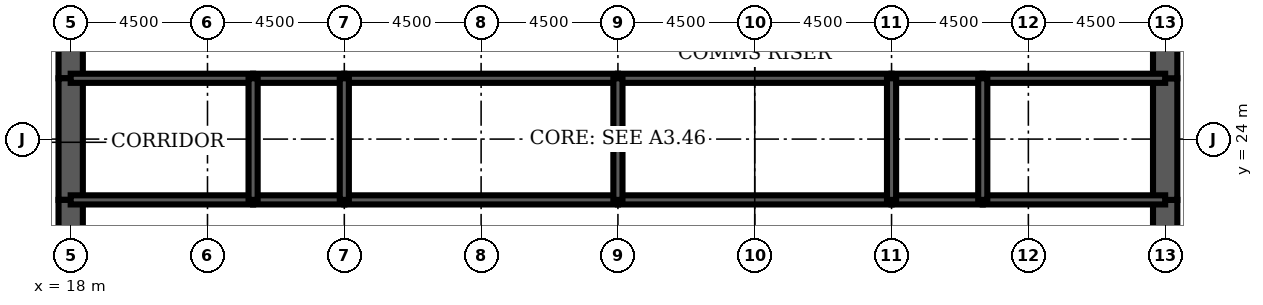
"""IFC4 building model, lengths in metres.
Left out: names, types, materials, properties, quantities, classifications, styles, units other than length and angle.
Written with IfcOpenShell. Run it as: python <this file> out.ifc"""

import sys

from ifc_helpers import new_model, si_unit, direction, frame, frame_2d, origin, place, context, subcontext, project, spatial, rectangle, extrude, element, fill, save


model = new_model("IFC4")
c1 = context("Model", 3, precision=1e-05, world=origin(), true_north=direction((0.0, 1.0)))
c2 = subcontext(c1, "Body", "Model", "MODEL_VIEW")
j1 = project(units=[si_unit("LENGTHUNIT", "METRE"), si_unit("PLANEANGLEUNIT", "RADIAN")], contexts=[c1])
p1 = place(None, origin())
s1 = spatial("IfcSite", under=j1, at=p1, CompositionType="ELEMENT")
p2 = place(p1, origin())
s2 = spatial("IfcBuilding", under=s1, at=p2, CompositionType="ELEMENT")
p3 = place(p2, frame((0.0, 0.0, 198.4)))
s3 = spatial("IfcBuildingStorey", under=s2, at=p3, CompositionType="ELEMENT", Elevation=198.4)
p4 = place(p3, frame((18.0, 28.8, 0.0), z_axis=(0.0, 0.0, 1.0), x_axis=(0.0, -1.0, 0.0)))
e1 = element("IfcWall", 1, at=p4, inside=s3, PredefinedType="SHEAR", context=c2, shape_type="SweptSolid", body=[
    extrude(rectangle(XDim=2.8, YDim=0.8, at=frame_2d((1.4, 0.0))), origin(), (0.0, 0.0, 1.0), 4.2),
])
p5 = place(p4, frame((0.4, 0.0, 0.0)))
e2 = element("IfcOpeningElement", 2, at=p5, cuts=e1, PredefinedType="OPENING", context=c2, shape_type="SweptSolid", body=[
    extrude(rectangle(XDim=1.8, YDim=2.1, at=frame_2d((0.9, 1.05))), frame((0.0, 0.41, 0.0), z_axis=(0.0, -1.0, 0.0), x_axis=(1.0, 0.0, 0.0)), (0.0, 0.0, 1.0), 0.82),
])
p6 = place(p3, frame((18.0, 26.0, 0.0), z_axis=(0.0, 0.0, 1.0), x_axis=(0.0, -1.0, 0.0)))
e3 = element("IfcWall", 3, at=p6, inside=s3, PredefinedType="SHEAR", context=c2, shape_type="SweptSolid", body=[
    extrude(rectangle(XDim=4.0, YDim=0.8, at=frame_2d((2.0, 0.0))), origin(), (0.0, 0.0, 1.0), 4.2),
])
p7 = place(p3, frame((18.0, 22.0, 0.0), z_axis=(0.0, 0.0, 1.0), x_axis=(0.0, -1.0, 0.0)))
e4 = element("IfcWall", 4, at=p7, inside=s3, PredefinedType="SHEAR", context=c2, shape_type="SweptSolid", body=[
    extrude(rectangle(XDim=2.8, YDim=0.8, at=frame_2d((1.4, 0.0))), origin(), (0.0, 0.0, 1.0), 4.2),
])
p8 = place(p7, frame((0.6, 0.0, 0.0)))
e5 = element("IfcOpeningElement", 5, at=p8, cuts=e4, PredefinedType="OPENING", context=c2, shape_type="SweptSolid", body=[
    extrude(rectangle(XDim=1.8, YDim=2.1, at=frame_2d((0.9, 1.05))), frame((0.0, 0.41, 0.0), z_axis=(0.0, -1.0, 0.0), x_axis=(1.0, 0.0, 0.0)), (0.0, 0.0, 1.0), 0.82),
])
p9 = place(p3, frame((54.0, 19.2, 0.0), z_axis=(0.0, 0.0, 1.0), x_axis=(0.0, 1.0, 0.0)))
e6 = element("IfcWall", 6, at=p9, inside=s3, PredefinedType="SHEAR", context=c2, shape_type="SweptSolid", body=[
    extrude(rectangle(XDim=2.8, YDim=0.8, at=frame_2d((1.4, 0.0))), origin(), (0.0, 0.0, 1.0), 4.2),
])
p10 = place(p9, frame((0.4, 0.0, 0.0)))
e7 = element("IfcOpeningElement", 7, at=p10, cuts=e6, PredefinedType="OPENING", context=c2, shape_type="SweptSolid", body=[
    extrude(rectangle(XDim=1.8, YDim=2.1, at=frame_2d((0.9, 1.05))), frame((0.0, 0.41, 0.0), z_axis=(0.0, -1.0, 0.0), x_axis=(1.0, 0.0, 0.0)), (0.0, 0.0, 1.0), 0.82),
])
p11 = place(p3, frame((54.0, 22.0, 0.0), z_axis=(0.0, 0.0, 1.0), x_axis=(0.0, 1.0, 0.0)))
e8 = element("IfcWall", 8, at=p11, inside=s3, PredefinedType="SHEAR", context=c2, shape_type="SweptSolid", body=[
    extrude(rectangle(XDim=4.0, YDim=0.8, at=frame_2d((2.0, 0.0))), origin(), (0.0, 0.0, 1.0), 4.2),
])
p12 = place(p3, frame((54.0, 26.0, 0.0), z_axis=(0.0, 0.0, 1.0), x_axis=(0.0, 1.0, 0.0)))
e9 = element("IfcWall", 9, at=p12, inside=s3, PredefinedType="SHEAR", context=c2, shape_type="SweptSolid", body=[
    extrude(rectangle(XDim=2.8, YDim=0.8, at=frame_2d((1.4, 0.0))), origin(), (0.0, 0.0, 1.0), 4.2),
])
p13 = place(p12, frame((0.6, 0.0, 0.0)))
e10 = element("IfcOpeningElement", 10, at=p13, cuts=e9, PredefinedType="OPENING", context=c2, shape_type="SweptSolid", body=[
    extrude(rectangle(XDim=1.8, YDim=2.1, at=frame_2d((0.9, 1.05))), frame((0.0, 0.41, 0.0), z_axis=(0.0, -1.0, 0.0), x_axis=(1.0, 0.0, 0.0)), (0.0, 0.0, 1.0), 0.82),
])
p14 = place(p3, frame((18.0, 22.0, 0.0), z_axis=(0.0, 0.0, 1.0), x_axis=(1.0, 0.0, 0.0)))
e11 = element("IfcWall", 11, at=p14, inside=s3, PredefinedType="SOLIDWALL", context=c2, shape_type="SweptSolid", body=[
    extrude(rectangle(XDim=6.0, YDim=0.3, at=frame_2d((3.0, 0.0))), origin(), (0.0, 0.0, 1.0), 4.2),
])
p15 = place(p14, frame((2.0, 0.0, 0.0)))
e12 = element("IfcOpeningElement", 12, at=p15, cuts=e11, PredefinedType="OPENING", context=c2, shape_type="SweptSolid", body=[
    extrude(rectangle(XDim=1.0, YDim=2.1, at=frame_2d((0.5, 1.05))), frame((0.0, 0.16, 0.0), z_axis=(0.0, -1.0, 0.0), x_axis=(1.0, 0.0, 0.0)), (0.0, 0.0, 1.0), 0.32),
])
p16 = place(p3, frame((24.0, 22.0, 0.0), z_axis=(0.0, 0.0, 1.0), x_axis=(1.0, 0.0, 0.0)))
e13 = element("IfcWall", 13, at=p16, inside=s3, PredefinedType="SOLIDWALL", context=c2, shape_type="SweptSolid", body=[
    extrude(rectangle(XDim=3.0, YDim=0.3, at=frame_2d((1.5, 0.0))), origin(), (0.0, 0.0, 1.0), 4.2),
])
p17 = place(p16, frame((1.0, 0.0, 0.0)))
e14 = element("IfcOpeningElement", 14, at=p17, cuts=e13, PredefinedType="OPENING", context=c2, shape_type="SweptSolid", body=[
    extrude(rectangle(XDim=1.0, YDim=2.1, at=frame_2d((0.5, 1.05))), frame((0.0, 0.16, 0.0), z_axis=(0.0, -1.0, 0.0), x_axis=(1.0, 0.0, 0.0)), (0.0, 0.0, 1.0), 0.32),
])
p18 = place(p3, frame((27.0, 22.0, 0.0), z_axis=(0.0, 0.0, 1.0), x_axis=(1.0, 0.0, 0.0)))
e15 = element("IfcWall", 15, at=p18, inside=s3, PredefinedType="SOLIDWALL", context=c2, shape_type="SweptSolid", body=[
    extrude(rectangle(XDim=9.0, YDim=0.3, at=frame_2d((4.5, 0.0))), origin(), (0.0, 0.0, 1.0), 4.2),
])
p19 = place(p18, frame((4.0, 0.0, 0.0)))
e16 = element("IfcOpeningElement", 16, at=p19, cuts=e15, PredefinedType="OPENING", context=c2, shape_type="SweptSolid", body=[
    extrude(rectangle(XDim=1.0, YDim=2.1, at=frame_2d((0.5, 1.05))), frame((0.0, 0.16, 0.0), z_axis=(0.0, -1.0, 0.0), x_axis=(1.0, 0.0, 0.0)), (0.0, 0.0, 1.0), 0.32),
])
p20 = place(p3, frame((36.0, 22.0, 0.0), z_axis=(0.0, 0.0, 1.0), x_axis=(1.0, 0.0, 0.0)))
e17 = element("IfcWall", 17, at=p20, inside=s3, PredefinedType="SOLIDWALL", context=c2, shape_type="SweptSolid", body=[
    extrude(rectangle(XDim=9.0, YDim=0.3, at=frame_2d((4.5, 0.0))), origin(), (0.0, 0.0, 1.0), 4.2),
])
p21 = place(p20, frame((4.0, 0.0, 0.0)))
e18 = element("IfcOpeningElement", 18, at=p21, cuts=e17, PredefinedType="OPENING", context=c2, shape_type="SweptSolid", body=[
    extrude(rectangle(XDim=1.0, YDim=2.1, at=frame_2d((0.5, 1.05))), frame((0.0, 0.16, 0.0), z_axis=(0.0, -1.0, 0.0), x_axis=(1.0, 0.0, 0.0)), (0.0, 0.0, 1.0), 0.32),
])
p22 = place(p3, frame((45.0, 22.0, 0.0), z_axis=(0.0, 0.0, 1.0), x_axis=(1.0, 0.0, 0.0)))
e19 = element("IfcWall", 19, at=p22, inside=s3, PredefinedType="SOLIDWALL", context=c2, shape_type="SweptSolid", body=[
    extrude(rectangle(XDim=3.0, YDim=0.3, at=frame_2d((1.5, 0.0))), origin(), (0.0, 0.0, 1.0), 4.2),
])
p23 = place(p22, frame((1.0, 0.0, 0.0)))
e20 = element("IfcOpeningElement", 20, at=p23, cuts=e19, PredefinedType="OPENING", context=c2, shape_type="SweptSolid", body=[
    extrude(rectangle(XDim=1.0, YDim=2.1, at=frame_2d((0.5, 1.05))), frame((0.0, 0.16, 0.0), z_axis=(0.0, -1.0, 0.0), x_axis=(1.0, 0.0, 0.0)), (0.0, 0.0, 1.0), 0.32),
])
p24 = place(p3, frame((48.0, 22.0, 0.0), z_axis=(0.0, 0.0, 1.0), x_axis=(1.0, 0.0, 0.0)))
e21 = element("IfcWall", 21, at=p24, inside=s3, PredefinedType="SOLIDWALL", context=c2, shape_type="SweptSolid", body=[
    extrude(rectangle(XDim=6.0, YDim=0.3, at=frame_2d((3.0, 0.0))), origin(), (0.0, 0.0, 1.0), 4.2),
])
p25 = place(p24, frame((2.0, 0.0, 0.0)))
e22 = element("IfcOpeningElement", 22, at=p25, cuts=e21, PredefinedType="OPENING", context=c2, shape_type="SweptSolid", body=[
    extrude(rectangle(XDim=1.0, YDim=2.1, at=frame_2d((0.5, 1.05))), frame((0.0, 0.16, 0.0), z_axis=(0.0, -1.0, 0.0), x_axis=(1.0, 0.0, 0.0)), (0.0, 0.0, 1.0), 0.32),
])
p26 = place(p24, frame((4.05, 0.0, 0.0)))
e23 = element("IfcOpeningElement", 23, at=p26, cuts=e21, PredefinedType="OPENING", context=c2, shape_type="SweptSolid", body=[
    extrude(rectangle(XDim=1.0, YDim=2.1, at=frame_2d((0.5, 1.05))), frame((0.0, 0.16, 0.0), z_axis=(0.0, -1.0, 0.0), x_axis=(1.0, 0.0, 0.0)), (0.0, 0.0, 1.0), 0.32),
])
p27 = place(p3, frame((18.0, 26.0, 0.0), z_axis=(0.0, 0.0, 1.0), x_axis=(1.0, 0.0, 0.0)))
e24 = element("IfcWall", 24, at=p27, inside=s3, PredefinedType="SOLIDWALL", context=c2, shape_type="SweptSolid", body=[
    extrude(rectangle(XDim=6.0, YDim=0.3, at=frame_2d((3.0, 0.0))), origin(), (0.0, 0.0, 1.0), 4.2),
])
p28 = place(p3, frame((24.0, 26.0, 0.0), z_axis=(0.0, 0.0, 1.0), x_axis=(1.0, 0.0, 0.0)))
e25 = element("IfcWall", 25, at=p28, inside=s3, PredefinedType="SOLIDWALL", context=c2, shape_type="SweptSolid", body=[
    extrude(rectangle(XDim=3.0, YDim=0.3, at=frame_2d((1.5, 0.0))), origin(), (0.0, 0.0, 1.0), 4.2),
])
for number, where, z_axis, x_axis in (
    (26, (27.0, 26.0, 0.0), (0.0, 0.0, 1.0), (1.0, 0.0, 0.0)),
    (27, (36.0, 26.0, 0.0), (0.0, 0.0, 1.0), (1.0, 0.0, 0.0)),
):
    element("IfcWall", number, at=place(p3, frame(where, z_axis=z_axis, x_axis=x_axis)), inside=s3, PredefinedType="SOLIDWALL", context=c2, shape_type="SweptSolid", body=[
        extrude(rectangle(XDim=9.0, YDim=0.3, at=frame_2d((4.5, 0.0))), origin(), (0.0, 0.0, 1.0), 4.2),
    ])
p29 = place(p3, frame((45.0, 26.0, 0.0), z_axis=(0.0, 0.0, 1.0), x_axis=(1.0, 0.0, 0.0)))
e28 = element("IfcWall", 28, at=p29, inside=s3, PredefinedType="SOLIDWALL", context=c2, shape_type="SweptSolid", body=[
    extrude(rectangle(XDim=3.0, YDim=0.3, at=frame_2d((1.5, 0.0))), origin(), (0.0, 0.0, 1.0), 4.2),
])
p30 = place(p3, frame((48.0, 26.0, 0.0), z_axis=(0.0, 0.0, 1.0), x_axis=(1.0, 0.0, 0.0)))
e29 = element("IfcWall", 29, at=p30, inside=s3, PredefinedType="SOLIDWALL", context=c2, shape_type="SweptSolid", body=[
    extrude(rectangle(XDim=6.0, YDim=0.3, at=frame_2d((3.0, 0.0))), origin(), (0.0, 0.0, 1.0), 4.2),
])
for number, where, z_axis, x_axis in (
    (30, (24.0, 22.0, 0.0), (0.0, 0.0, 1.0), (0.0, 1.0, 0.0)),
    (31, (27.0, 22.0, 0.0), (0.0, 0.0, 1.0), (0.0, 1.0, 0.0)),
    (32, (36.0, 22.0, 0.0), (0.0, 0.0, 1.0), (0.0, 1.0, 0.0)),
    (33, (45.0, 22.0, 0.0), (0.0, 0.0, 1.0), (0.0, 1.0, 0.0)),
    (34, (48.0, 22.0, 0.0), (0.0, 0.0, 1.0), (0.0, 1.0, 0.0)),
):
    element("IfcWall", number, at=place(p3, frame(where, z_axis=z_axis, x_axis=x_axis)), inside=s3, PredefinedType="SOLIDWALL", context=c2, shape_type="SweptSolid", body=[
        extrude(rectangle(XDim=4.0, YDim=0.3, at=frame_2d((2.0, 0.0))), origin(), (0.0, 0.0, 1.0), 4.2),
    ])
p31 = place(p3, frame((42.0, 22.15, 0.0), z_axis=(0.0, 0.0, 1.0), x_axis=(0.0, 1.0, 0.0)))
e35 = element("IfcWall", 35, at=p31, inside=s3, PredefinedType="PARTITIONING", context=c2, shape_type="SweptSolid", body=[
    extrude(rectangle(XDim=3.7, YDim=0.15, at=frame_2d((1.85, 0.0))), origin(), (0.0, 0.0, 1.0), 3.0),
])
p32 = place(p31, frame((2.2, 0.0, 0.0)))
e36 = element("IfcOpeningElement", 36, at=p32, cuts=e35, PredefinedType="OPENING", context=c2, shape_type="SweptSolid", body=[
    extrude(rectangle(XDim=1.0, YDim=2.1, at=frame_2d((0.5, 1.05))), frame((0.0, 0.085, 0.0), z_axis=(0.0, -1.0, 0.0), x_axis=(1.0, 0.0, 0.0)), (0.0, 0.0, 1.0), 0.17),
])
p33 = place(p3, frame((51.425, 22.15, 0.0), z_axis=(0.0, 0.0, 1.0), x_axis=(0.0, 1.0, 0.0)))
e37 = element("IfcWall", 37, at=p33, inside=s3, PredefinedType="PARTITIONING", context=c2, shape_type="SweptSolid", body=[
    extrude(rectangle(XDim=3.7, YDim=0.15, at=frame_2d((1.85, 0.0))), origin(), (0.0, 0.0, 1.0), 3.0),
])
p34 = place(p3, frame((49.4, 19.35, 0.0), z_axis=(0.0, 0.0, 1.0), x_axis=(0.0, 1.0, 0.0)))
e38 = element("IfcWall", 38, at=p34, inside=s3, PredefinedType="PARTITIONING", context=c2, shape_type="SweptSolid", body=[
    extrude(rectangle(XDim=2.5, YDim=0.15, at=frame_2d((1.25, 0.0))), origin(), (0.0, 0.0, 1.0), 3.0),
])
p35 = place(p34, frame((1.15, 0.0, 0.0)))
e39 = element("IfcOpeningElement", 39, at=p35, cuts=e38, PredefinedType="OPENING", context=c2, shape_type="SweptSolid", body=[
    extrude(rectangle(XDim=1.0, YDim=2.1, at=frame_2d((0.5, 1.05))), frame((0.0, 0.085, 0.0), z_axis=(0.0, -1.0, 0.0), x_axis=(1.0, 0.0, 0.0)), (0.0, 0.0, 1.0), 0.17),
])
p36 = place(p32, origin())
e40 = element("IfcDoor", 40, at=p36, inside=s3, OperationType="SINGLE_SWING_RIGHT", PredefinedType="DOOR", context=c2, shape_type="SweptSolid", body=[
    extrude(rectangle(XDim=1.0, YDim=2.1, at=frame_2d((0.5, 1.05))), frame((0.0, 0.025, 0.0), z_axis=(0.0, -1.0, 0.0), x_axis=(1.0, 0.0, 0.0)), (0.0, 0.0, 1.0), 0.05),
])
fill(e36, e40)
p37 = place(p35, origin())
e41 = element("IfcDoor", 41, at=p37, inside=s3, OperationType="SINGLE_SWING_RIGHT", PredefinedType="DOOR", context=c2, shape_type="SweptSolid", body=[
    extrude(rectangle(XDim=1.0, YDim=2.1, at=frame_2d((0.5, 1.05))), frame((0.0, 0.025, 0.0), z_axis=(0.0, -1.0, 0.0), x_axis=(1.0, 0.0, 0.0)), (0.0, 0.0, 1.0), 0.05),
])
fill(e39, e41)
p38 = place(p8, origin())
e42 = element("IfcDoor", 42, at=p38, inside=s3, OperationType="SINGLE_SWING_LEFT", PredefinedType="DOOR", context=c2, shape_type="SweptSolid", body=[
    extrude(rectangle(XDim=1.8, YDim=2.1, at=frame_2d((0.9, 1.05))), frame((0.0, 0.4, 0.0), z_axis=(0.0, -1.0, 0.0), x_axis=(1.0, 0.0, 0.0)), (0.0, 0.0, 1.0), 0.8),
])
fill(e5, e42)
p39 = place(p5, origin())
e43 = element("IfcDoor", 43, at=p39, inside=s3, OperationType="SINGLE_SWING_LEFT", PredefinedType="DOOR", context=c2, shape_type="SweptSolid", body=[
    extrude(rectangle(XDim=1.8, YDim=2.1, at=frame_2d((0.9, 1.05))), frame((0.0, 0.4, 0.0), z_axis=(0.0, -1.0, 0.0), x_axis=(1.0, 0.0, 0.0)), (0.0, 0.0, 1.0), 0.8),
])
fill(e2, e43)
p40 = place(p10, origin())
e44 = element("IfcDoor", 44, at=p40, inside=s3, OperationType="SINGLE_SWING_LEFT", PredefinedType="DOOR", context=c2, shape_type="SweptSolid", body=[
    extrude(rectangle(XDim=1.8, YDim=2.1, at=frame_2d((0.9, 1.05))), frame((0.0, 0.4, 0.0), z_axis=(0.0, -1.0, 0.0), x_axis=(1.0, 0.0, 0.0)), (0.0, 0.0, 1.0), 0.8),
])
fill(e7, e44)
p41 = place(p13, origin())
e45 = element("IfcDoor", 45, at=p41, inside=s3, OperationType="SINGLE_SWING_LEFT", PredefinedType="DOOR", context=c2, shape_type="SweptSolid", body=[
    extrude(rectangle(XDim=1.8, YDim=2.1, at=frame_2d((0.9, 1.05))), frame((0.0, 0.4, 0.0), z_axis=(0.0, -1.0, 0.0), x_axis=(1.0, 0.0, 0.0)), (0.0, 0.0, 1.0), 0.8),
])
fill(e10, e45)
p42 = place(p15, origin())
e46 = element("IfcDoor", 46, at=p42, inside=s3, OperationType="SINGLE_SWING_LEFT", PredefinedType="DOOR", context=c2, shape_type="SweptSolid", body=[
    extrude(rectangle(XDim=1.0, YDim=2.1, at=frame_2d((0.5, 1.05))), frame((0.0, 0.025, 0.0), z_axis=(0.0, -1.0, 0.0), x_axis=(1.0, 0.0, 0.0)), (0.0, 0.0, 1.0), 0.05),
])
fill(e12, e46)
p43 = place(p17, origin())
e47 = element("IfcDoor", 47, at=p43, inside=s3, OperationType="SINGLE_SWING_LEFT", PredefinedType="DOOR", context=c2, shape_type="SweptSolid", body=[
    extrude(rectangle(XDim=1.0, YDim=2.1, at=frame_2d((0.5, 1.05))), frame((0.0, 0.025, 0.0), z_axis=(0.0, -1.0, 0.0), x_axis=(1.0, 0.0, 0.0)), (0.0, 0.0, 1.0), 0.05),
])
fill(e14, e47)
p44 = place(p19, origin())
e48 = element("IfcDoor", 48, at=p44, inside=s3, OperationType="SINGLE_SWING_LEFT", PredefinedType="DOOR", context=c2, shape_type="SweptSolid", body=[
    extrude(rectangle(XDim=1.0, YDim=2.1, at=frame_2d((0.5, 1.05))), frame((0.0, 0.025, 0.0), z_axis=(0.0, -1.0, 0.0), x_axis=(1.0, 0.0, 0.0)), (0.0, 0.0, 1.0), 0.05),
])
fill(e16, e48)
p45 = place(p21, origin())
e49 = element("IfcDoor", 49, at=p45, inside=s3, OperationType="SINGLE_SWING_LEFT", PredefinedType="DOOR", context=c2, shape_type="SweptSolid", body=[
    extrude(rectangle(XDim=1.0, YDim=2.1, at=frame_2d((0.5, 1.05))), frame((0.0, 0.025, 0.0), z_axis=(0.0, -1.0, 0.0), x_axis=(1.0, 0.0, 0.0)), (0.0, 0.0, 1.0), 0.05),
])
fill(e18, e49)
p46 = place(p23, origin())
e50 = element("IfcDoor", 50, at=p46, inside=s3, OperationType="SINGLE_SWING_LEFT", PredefinedType="DOOR", context=c2, shape_type="SweptSolid", body=[
    extrude(rectangle(XDim=1.0, YDim=2.1, at=frame_2d((0.5, 1.05))), frame((0.0, 0.025, 0.0), z_axis=(0.0, -1.0, 0.0), x_axis=(1.0, 0.0, 0.0)), (0.0, 0.0, 1.0), 0.05),
])
fill(e20, e50)
p47 = place(p25, origin())
e51 = element("IfcDoor", 51, at=p47, inside=s3, OperationType="SINGLE_SWING_LEFT", PredefinedType="DOOR", context=c2, shape_type="SweptSolid", body=[
    extrude(rectangle(XDim=1.0, YDim=2.1, at=frame_2d((0.5, 1.05))), frame((0.0, 0.025, 0.0), z_axis=(0.0, -1.0, 0.0), x_axis=(1.0, 0.0, 0.0)), (0.0, 0.0, 1.0), 0.05),
])
fill(e22, e51)
p48 = place(p26, origin())
e52 = element("IfcDoor", 52, at=p48, inside=s3, OperationType="SINGLE_SWING_RIGHT", PredefinedType="DOOR", context=c2, shape_type="SweptSolid", body=[
    extrude(rectangle(XDim=1.0, YDim=2.1, at=frame_2d((0.5, 1.05))), frame((0.0, 0.025, 0.0), z_axis=(0.0, -1.0, 0.0), x_axis=(1.0, 0.0, 0.0)), (0.0, 0.0, 1.0), 0.05),
])
fill(e23, e52)
save(model, sys.argv[1])
